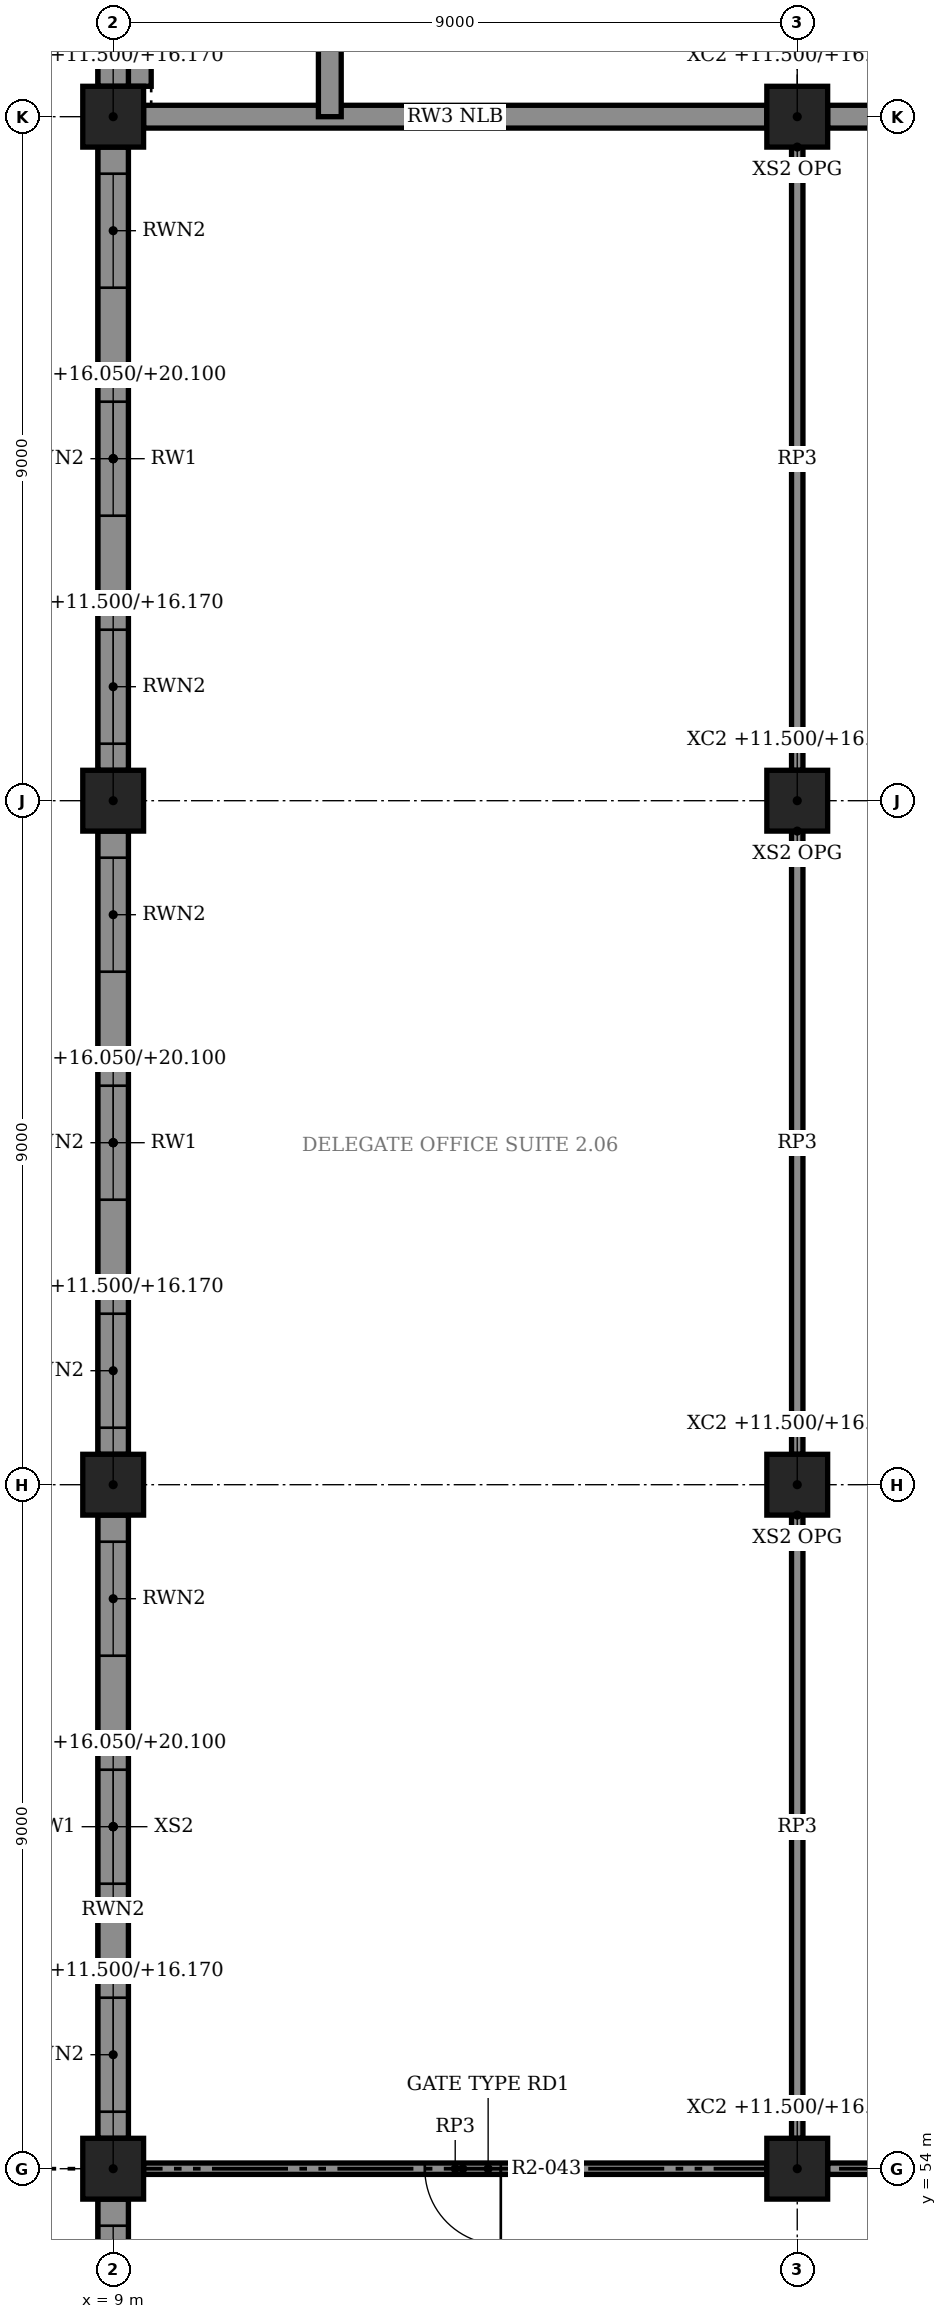
"""IFC4 building model, lengths in metres.
Left out: names, types, materials, properties, quantities, classifications, styles, units other than length and angle.
Written with IfcOpenShell. Run it as: python <this file> out.ifc"""

import sys

from ifc_helpers import new_model, si_unit, direction, frame, frame_2d, origin, origin_2d, place, context, subcontext, project, spatial, rectangle, extrude, element, fill, save


model = new_model("IFC4")
c1 = context("Model", 3, precision=1e-05, world=origin(), true_north=direction((0.0, 1.0)))
c2 = subcontext(c1, "Body", "Model", "MODEL_VIEW")
j1 = project(units=[si_unit("LENGTHUNIT", "METRE"), si_unit("PLANEANGLEUNIT", "RADIAN")], contexts=[c1])
p1 = place(None, origin())
s1 = spatial("IfcSite", under=j1, at=p1, CompositionType="ELEMENT")
p2 = place(p1, origin())
s2 = spatial("IfcBuilding", under=s1, at=p2, CompositionType="ELEMENT")
p3 = place(p2, frame((0.0, 0.0, 11.5)))
s3 = spatial("IfcBuildingStorey", under=s2, at=p3, CompositionType="ELEMENT", Elevation=11.5)
for number, where, z_axis, x_axis in (
    (1, (9.0, 54.0, 0.0), (0.0, 0.0, 1.0), (1.0, 0.0, 0.0)),
    (2, (9.0, 63.0, 0.0), (0.0, 0.0, 1.0), (1.0, 0.0, 0.0)),
    (3, (9.0, 72.0, 0.0), (0.0, 0.0, 1.0), (1.0, 0.0, 0.0)),
    (4, (9.0, 81.0, 0.0), (0.0, 0.0, 1.0), (1.0, 0.0, 0.0)),
    (5, (18.0, 54.0, 0.0), (0.0, 0.0, 1.0), (1.0, 0.0, 0.0)),
    (6, (18.0, 63.0, 0.0), (0.0, 0.0, 1.0), (1.0, 0.0, 0.0)),
    (7, (18.0, 72.0, 0.0), (0.0, 0.0, 1.0), (1.0, 0.0, 0.0)),
    (8, (18.0, 81.0, 0.0), (0.0, 0.0, 1.0), (1.0, 0.0, 0.0)),
):
    element("IfcColumn", number, at=place(p3, frame(where, z_axis=z_axis, x_axis=x_axis)), inside=s3, PredefinedType="COLUMN", context=c2, shape_type="SweptSolid", body=[
        extrude(rectangle(XDim=0.8, YDim=0.8, at=origin_2d()), origin(), (0.0, 0.0, 1.0), 4.67),
    ])
for number, where, z_axis, x_axis in (
    (9, (9.0, 45.0, 4.55), (0.0, 0.0, 1.0), (0.0, 1.0, 0.0)),
    (10, (9.0, 54.0, 4.55), (0.0, 0.0, 1.0), (0.0, 1.0, 0.0)),
    (11, (9.0, 63.0, 4.55), (0.0, 0.0, 1.0), (0.0, 1.0, 0.0)),
    (12, (9.0, 72.0, 4.55), (0.0, 0.0, 1.0), (0.0, 1.0, 0.0)),
    (13, (9.0, 81.0, 4.55), (0.0, 0.0, 1.0), (0.0, 1.0, 0.0)),
):
    element("IfcWall", number, at=place(p3, frame(where, z_axis=z_axis, x_axis=x_axis)), inside=s3, PredefinedType="SOLIDWALL", context=c2, shape_type="SweptSolid", body=[
        extrude(rectangle(XDim=9.0, YDim=0.4, at=frame_2d((4.5, 0.0))), origin(), (0.0, 0.0, 1.0), 4.05),
    ])
p4 = place(p3, frame((9.0, 45.4, 0.0), z_axis=(0.0, 0.0, 1.0), x_axis=(0.0, 1.0, 0.0)))
e14 = element("IfcWall", 14, at=p4, inside=s3, PredefinedType="SOLIDWALL", context=c2, shape_type="SweptSolid", body=[
    extrude(rectangle(XDim=8.2, YDim=0.4, at=frame_2d((4.1, 0.0))), origin(), (0.0, 0.0, 1.0), 4.55),
])
p5 = place(p4, frame((0.35, 0.0, 0.9)))
e15 = element("IfcOpeningElement", 15, at=p5, cuts=e14, PredefinedType="OPENING", context=c2, shape_type="SweptSolid", body=[
    extrude(rectangle(XDim=1.5, YDim=2.4, at=frame_2d((0.75, 1.2))), frame((0.0, 0.21, 0.0), z_axis=(0.0, -1.0, 0.0), x_axis=(1.0, 0.0, 0.0)), (0.0, 0.0, 1.0), 0.42),
])
p6 = place(p4, frame((6.35, 0.0, 0.9)))
e16 = element("IfcOpeningElement", 16, at=p6, cuts=e14, PredefinedType="OPENING", context=c2, shape_type="SweptSolid", body=[
    extrude(rectangle(XDim=1.5, YDim=2.4, at=frame_2d((0.75, 1.2))), frame((0.0, 0.21, 0.0), z_axis=(0.0, -1.0, 0.0), x_axis=(1.0, 0.0, 0.0)), (0.0, 0.0, 1.0), 0.42),
])
p7 = place(p3, frame((9.0, 54.4, 0.0), z_axis=(0.0, 0.0, 1.0), x_axis=(0.0, 1.0, 0.0)))
e17 = element("IfcWall", 17, at=p7, inside=s3, PredefinedType="SOLIDWALL", context=c2, shape_type="SweptSolid", body=[
    extrude(rectangle(XDim=8.2, YDim=0.4, at=frame_2d((4.1, 0.0))), origin(), (0.0, 0.0, 1.0), 4.55),
])
p8 = place(p7, frame((0.35, 0.0, 0.9)))
e18 = element("IfcOpeningElement", 18, at=p8, cuts=e17, PredefinedType="OPENING", context=c2, shape_type="SweptSolid", body=[
    extrude(rectangle(XDim=1.5, YDim=2.4, at=frame_2d((0.75, 1.2))), frame((0.0, 0.21, 0.0), z_axis=(0.0, -1.0, 0.0), x_axis=(1.0, 0.0, 0.0)), (0.0, 0.0, 1.0), 0.42),
])
p9 = place(p7, frame((3.35, 0.0, 0.9)))
e19 = element("IfcOpeningElement", 19, at=p9, cuts=e17, PredefinedType="OPENING", context=c2, shape_type="SweptSolid", body=[
    extrude(rectangle(XDim=1.5, YDim=2.4, at=frame_2d((0.75, 1.2))), frame((0.0, 0.21, 0.0), z_axis=(0.0, -1.0, 0.0), x_axis=(1.0, 0.0, 0.0)), (0.0, 0.0, 1.0), 0.42),
])
p10 = place(p7, frame((6.35, 0.0, 0.9)))
e20 = element("IfcOpeningElement", 20, at=p10, cuts=e17, PredefinedType="OPENING", context=c2, shape_type="SweptSolid", body=[
    extrude(rectangle(XDim=1.5, YDim=2.4, at=frame_2d((0.75, 1.2))), frame((0.0, 0.21, 0.0), z_axis=(0.0, -1.0, 0.0), x_axis=(1.0, 0.0, 0.0)), (0.0, 0.0, 1.0), 0.42),
])
p11 = place(p3, frame((9.0, 63.4, 0.0), z_axis=(0.0, 0.0, 1.0), x_axis=(0.0, 1.0, 0.0)))
e21 = element("IfcWall", 21, at=p11, inside=s3, PredefinedType="SOLIDWALL", context=c2, shape_type="SweptSolid", body=[
    extrude(rectangle(XDim=8.2, YDim=0.4, at=frame_2d((4.1, 0.0))), origin(), (0.0, 0.0, 1.0), 4.55),
])
p12 = place(p11, frame((0.35, 0.0, 0.9)))
e22 = element("IfcOpeningElement", 22, at=p12, cuts=e21, PredefinedType="OPENING", context=c2, shape_type="SweptSolid", body=[
    extrude(rectangle(XDim=1.5, YDim=2.4, at=frame_2d((0.75, 1.2))), frame((0.0, 0.21, 0.0), z_axis=(0.0, -1.0, 0.0), x_axis=(1.0, 0.0, 0.0)), (0.0, 0.0, 1.0), 0.42),
])
p13 = place(p11, frame((3.35, 0.0, 0.9)))
e23 = element("IfcOpeningElement", 23, at=p13, cuts=e21, PredefinedType="OPENING", context=c2, shape_type="SweptSolid", body=[
    extrude(rectangle(XDim=1.5, YDim=2.4, at=frame_2d((0.75, 1.2))), frame((0.0, 0.21, 0.0), z_axis=(0.0, -1.0, 0.0), x_axis=(1.0, 0.0, 0.0)), (0.0, 0.0, 1.0), 0.42),
])
p14 = place(p11, frame((6.35, 0.0, 0.9)))
e24 = element("IfcOpeningElement", 24, at=p14, cuts=e21, PredefinedType="OPENING", context=c2, shape_type="SweptSolid", body=[
    extrude(rectangle(XDim=1.5, YDim=2.4, at=frame_2d((0.75, 1.2))), frame((0.0, 0.21, 0.0), z_axis=(0.0, -1.0, 0.0), x_axis=(1.0, 0.0, 0.0)), (0.0, 0.0, 1.0), 0.42),
])
p15 = place(p3, frame((9.0, 72.4, 0.0), z_axis=(0.0, 0.0, 1.0), x_axis=(0.0, 1.0, 0.0)))
e25 = element("IfcWall", 25, at=p15, inside=s3, PredefinedType="SOLIDWALL", context=c2, shape_type="SweptSolid", body=[
    extrude(rectangle(XDim=8.2, YDim=0.4, at=frame_2d((4.1, 0.0))), origin(), (0.0, 0.0, 1.0), 4.55),
])
p16 = place(p15, frame((0.35, 0.0, 0.9)))
e26 = element("IfcOpeningElement", 26, at=p16, cuts=e25, PredefinedType="OPENING", context=c2, shape_type="SweptSolid", body=[
    extrude(rectangle(XDim=1.5, YDim=2.4, at=frame_2d((0.75, 1.2))), frame((0.0, 0.21, 0.0), z_axis=(0.0, -1.0, 0.0), x_axis=(1.0, 0.0, 0.0)), (0.0, 0.0, 1.0), 0.42),
])
p17 = place(p15, frame((3.35, 0.0, 0.9)))
e27 = element("IfcOpeningElement", 27, at=p17, cuts=e25, PredefinedType="OPENING", context=c2, shape_type="SweptSolid", body=[
    extrude(rectangle(XDim=1.5, YDim=2.4, at=frame_2d((0.75, 1.2))), frame((0.0, 0.21, 0.0), z_axis=(0.0, -1.0, 0.0), x_axis=(1.0, 0.0, 0.0)), (0.0, 0.0, 1.0), 0.42),
])
p18 = place(p15, frame((6.35, 0.0, 0.9)))
e28 = element("IfcOpeningElement", 28, at=p18, cuts=e25, PredefinedType="OPENING", context=c2, shape_type="SweptSolid", body=[
    extrude(rectangle(XDim=1.5, YDim=2.4, at=frame_2d((0.75, 1.2))), frame((0.0, 0.21, 0.0), z_axis=(0.0, -1.0, 0.0), x_axis=(1.0, 0.0, 0.0)), (0.0, 0.0, 1.0), 0.42),
])
p19 = place(p3, frame((9.0, 81.4, 0.0), z_axis=(0.0, 0.0, 1.0), x_axis=(0.0, 1.0, 0.0)))
e29 = element("IfcWall", 29, at=p19, inside=s3, PredefinedType="SOLIDWALL", context=c2, shape_type="SweptSolid", body=[
    extrude(rectangle(XDim=8.2, YDim=0.4, at=frame_2d((4.1, 0.0))), origin(), (0.0, 0.0, 1.0), 4.55),
])
p20 = place(p19, frame((5.15, 0.0, 1.2)))
e30 = element("IfcOpeningElement", 30, at=p20, cuts=e29, PredefinedType="OPENING", context=c2, shape_type="SweptSolid", body=[
    extrude(rectangle(XDim=1.5, YDim=1.8, at=frame_2d((0.75, 0.9))), frame((0.0, 0.21, 0.0), z_axis=(0.0, -1.0, 0.0), x_axis=(1.0, 0.0, 0.0)), (0.0, 0.0, 1.0), 0.42),
])
for number, where, z_axis, x_axis in (
    (31, (9.4, 81.0, 0.0), (0.0, 0.0, 1.0), (1.0, 0.0, 0.0)),
    (32, (18.4, 81.0, 0.0), (0.0, 0.0, 1.0), (1.0, 0.0, 0.0)),
):
    element("IfcWall", number, at=place(p3, frame(where, z_axis=z_axis, x_axis=x_axis)), inside=s3, PredefinedType="SOLIDWALL", context=c2, shape_type="SweptSolid", body=[
        extrude(rectangle(XDim=8.2, YDim=0.3, at=frame_2d((4.1, 0.0))), origin(), (0.0, 0.0, 1.0), 4.3),
    ])
p21 = place(p3, frame((11.85, 83.7, 0.0), z_axis=(0.0, 0.0, 1.0), x_axis=(0.0, -1.0, 0.0)))
e33 = element("IfcWall", 33, at=p21, inside=s3, PredefinedType="SOLIDWALL", context=c2, shape_type="SweptSolid", body=[
    extrude(rectangle(XDim=2.7, YDim=0.3, at=frame_2d((1.35, 0.0))), origin(), (0.0, 0.0, 1.0), 4.3),
])
p22 = place(p3, frame((9.35, 83.7, 0.0), z_axis=(0.0, 0.0, 1.0), x_axis=(0.0, -1.0, 0.0)))
e34 = element("IfcWall", 34, at=p22, inside=s3, PredefinedType="SOLIDWALL", context=c2, shape_type="SweptSolid", body=[
    extrude(rectangle(XDim=2.3, YDim=0.3, at=frame_2d((1.15, 0.0))), origin(), (0.0, 0.0, 1.0), 4.3),
])
p23 = place(p3, frame((9.4, 54.0, 0.0), z_axis=(0.0, 0.0, 1.0), x_axis=(1.0, 0.0, 0.0)))
e35 = element("IfcWall", 35, at=p23, inside=s3, PredefinedType="PARTITIONING", context=c2, shape_type="SweptSolid", body=[
    extrude(rectangle(XDim=8.2, YDim=0.15, at=frame_2d((4.1, 0.0))), origin(), (0.0, 0.0, 1.0), 4.55),
])
p24 = place(p23, frame((3.7, 0.0, 0.0)))
e36 = element("IfcOpeningElement", 36, at=p24, cuts=e35, PredefinedType="OPENING", context=c2, shape_type="SweptSolid", body=[
    extrude(rectangle(XDim=1.0, YDim=2.4, at=frame_2d((0.5, 1.2))), frame((0.0, 0.085, 0.0), z_axis=(0.0, -1.0, 0.0), x_axis=(1.0, 0.0, 0.0)), (0.0, 0.0, 1.0), 0.17),
])
p25 = place(p3, frame((18.4, 54.0, 0.0), z_axis=(0.0, 0.0, 1.0), x_axis=(1.0, 0.0, 0.0)))
e37 = element("IfcWall", 37, at=p25, inside=s3, PredefinedType="PARTITIONING", context=c2, shape_type="SweptSolid", body=[
    extrude(rectangle(XDim=8.2, YDim=0.15, at=frame_2d((4.1, 0.0))), origin(), (0.0, 0.0, 1.0), 4.55),
])
p26 = place(p25, frame((3.7, 0.0, 0.0)))
e38 = element("IfcOpeningElement", 38, at=p26, cuts=e37, PredefinedType="OPENING", context=c2, shape_type="SweptSolid", body=[
    extrude(rectangle(XDim=1.0, YDim=2.4, at=frame_2d((0.5, 1.2))), frame((0.0, 0.085, 0.0), z_axis=(0.0, -1.0, 0.0), x_axis=(1.0, 0.0, 0.0)), (0.0, 0.0, 1.0), 0.17),
])
for number, where, z_axis, x_axis in (
    (39, (18.0, 54.4, 0.0), (0.0, 0.0, 1.0), (0.0, 1.0, 0.0)),
    (40, (18.0, 63.4, 0.0), (0.0, 0.0, 1.0), (0.0, 1.0, 0.0)),
    (41, (18.0, 72.4, 0.0), (0.0, 0.0, 1.0), (0.0, 1.0, 0.0)),
):
    element("IfcWall", number, at=place(p3, frame(where, z_axis=z_axis, x_axis=x_axis)), inside=s3, PredefinedType="PARTITIONING", context=c2, shape_type="SweptSolid", body=[
        extrude(rectangle(XDim=8.2, YDim=0.15, at=frame_2d((4.1, 0.0))), origin(), (0.0, 0.0, 1.0), 4.55),
    ])
p27 = place(p6, origin())
e42 = element("IfcWindow", 42, at=p27, inside=s3, PartitioningType="SINGLE_PANEL", PredefinedType="WINDOW", context=c2, shape_type="SweptSolid", body=[
    extrude(rectangle(XDim=1.5, YDim=2.4, at=frame_2d((0.75, 1.2))), frame((0.0, 0.03, 0.0), z_axis=(0.0, -1.0, 0.0), x_axis=(1.0, 0.0, 0.0)), (0.0, 0.0, 1.0), 0.06),
])
fill(e16, e42)
p28 = place(p8, origin())
e43 = element("IfcWindow", 43, at=p28, inside=s3, PartitioningType="SINGLE_PANEL", PredefinedType="WINDOW", context=c2, shape_type="SweptSolid", body=[
    extrude(rectangle(XDim=1.5, YDim=2.4, at=frame_2d((0.75, 1.2))), frame((0.0, 0.03, 0.0), z_axis=(0.0, -1.0, 0.0), x_axis=(1.0, 0.0, 0.0)), (0.0, 0.0, 1.0), 0.06),
])
fill(e18, e43)
p29 = place(p9, origin())
e44 = element("IfcWindow", 44, at=p29, inside=s3, PartitioningType="SINGLE_PANEL", PredefinedType="WINDOW", context=c2, shape_type="SweptSolid", body=[
    extrude(rectangle(XDim=1.5, YDim=2.4, at=frame_2d((0.75, 1.2))), frame((0.0, 0.03, 0.0), z_axis=(0.0, -1.0, 0.0), x_axis=(1.0, 0.0, 0.0)), (0.0, 0.0, 1.0), 0.06),
])
fill(e19, e44)
p30 = place(p10, origin())
e45 = element("IfcWindow", 45, at=p30, inside=s3, PartitioningType="SINGLE_PANEL", PredefinedType="WINDOW", context=c2, shape_type="SweptSolid", body=[
    extrude(rectangle(XDim=1.5, YDim=2.4, at=frame_2d((0.75, 1.2))), frame((0.0, 0.03, 0.0), z_axis=(0.0, -1.0, 0.0), x_axis=(1.0, 0.0, 0.0)), (0.0, 0.0, 1.0), 0.06),
])
fill(e20, e45)
p31 = place(p12, origin())
e46 = element("IfcWindow", 46, at=p31, inside=s3, PartitioningType="SINGLE_PANEL", PredefinedType="WINDOW", context=c2, shape_type="SweptSolid", body=[
    extrude(rectangle(XDim=1.5, YDim=2.4, at=frame_2d((0.75, 1.2))), frame((0.0, 0.03, 0.0), z_axis=(0.0, -1.0, 0.0), x_axis=(1.0, 0.0, 0.0)), (0.0, 0.0, 1.0), 0.06),
])
fill(e22, e46)
p32 = place(p13, origin())
e47 = element("IfcWindow", 47, at=p32, inside=s3, PartitioningType="SINGLE_PANEL", PredefinedType="WINDOW", context=c2, shape_type="SweptSolid", body=[
    extrude(rectangle(XDim=1.5, YDim=2.4, at=frame_2d((0.75, 1.2))), frame((0.0, 0.03, 0.0), z_axis=(0.0, -1.0, 0.0), x_axis=(1.0, 0.0, 0.0)), (0.0, 0.0, 1.0), 0.06),
])
fill(e23, e47)
p33 = place(p14, origin())
e48 = element("IfcWindow", 48, at=p33, inside=s3, PartitioningType="SINGLE_PANEL", PredefinedType="WINDOW", context=c2, shape_type="SweptSolid", body=[
    extrude(rectangle(XDim=1.5, YDim=2.4, at=frame_2d((0.75, 1.2))), frame((0.0, 0.03, 0.0), z_axis=(0.0, -1.0, 0.0), x_axis=(1.0, 0.0, 0.0)), (0.0, 0.0, 1.0), 0.06),
])
fill(e24, e48)
p34 = place(p16, origin())
e49 = element("IfcWindow", 49, at=p34, inside=s3, PartitioningType="SINGLE_PANEL", PredefinedType="WINDOW", context=c2, shape_type="SweptSolid", body=[
    extrude(rectangle(XDim=1.5, YDim=2.4, at=frame_2d((0.75, 1.2))), frame((0.0, 0.03, 0.0), z_axis=(0.0, -1.0, 0.0), x_axis=(1.0, 0.0, 0.0)), (0.0, 0.0, 1.0), 0.06),
])
fill(e26, e49)
p35 = place(p17, origin())
e50 = element("IfcWindow", 50, at=p35, inside=s3, PartitioningType="SINGLE_PANEL", PredefinedType="WINDOW", context=c2, shape_type="SweptSolid", body=[
    extrude(rectangle(XDim=1.5, YDim=2.4, at=frame_2d((0.75, 1.2))), frame((0.0, 0.03, 0.0), z_axis=(0.0, -1.0, 0.0), x_axis=(1.0, 0.0, 0.0)), (0.0, 0.0, 1.0), 0.06),
])
fill(e27, e50)
p36 = place(p18, origin())
e51 = element("IfcWindow", 51, at=p36, inside=s3, PartitioningType="SINGLE_PANEL", PredefinedType="WINDOW", context=c2, shape_type="SweptSolid", body=[
    extrude(rectangle(XDim=1.5, YDim=2.4, at=frame_2d((0.75, 1.2))), frame((0.0, 0.03, 0.0), z_axis=(0.0, -1.0, 0.0), x_axis=(1.0, 0.0, 0.0)), (0.0, 0.0, 1.0), 0.06),
])
fill(e28, e51)
p37 = place(p24, frame((1.0, 0.0, 0.0), z_axis=(0.0, 0.0, 1.0), x_axis=(-1.0, 0.0, 0.0)))
e52 = element("IfcDoor", 52, at=p37, inside=s3, OperationType="SINGLE_SWING_LEFT", PredefinedType="DOOR", context=c2, shape_type="SweptSolid", body=[
    extrude(rectangle(XDim=1.0, YDim=2.4, at=frame_2d((0.5, 1.2))), frame((0.0, 0.025, 0.0), z_axis=(0.0, -1.0, 0.0), x_axis=(1.0, 0.0, 0.0)), (0.0, 0.0, 1.0), 0.05),
])
fill(e36, e52)
save(model, sys.argv[1])
